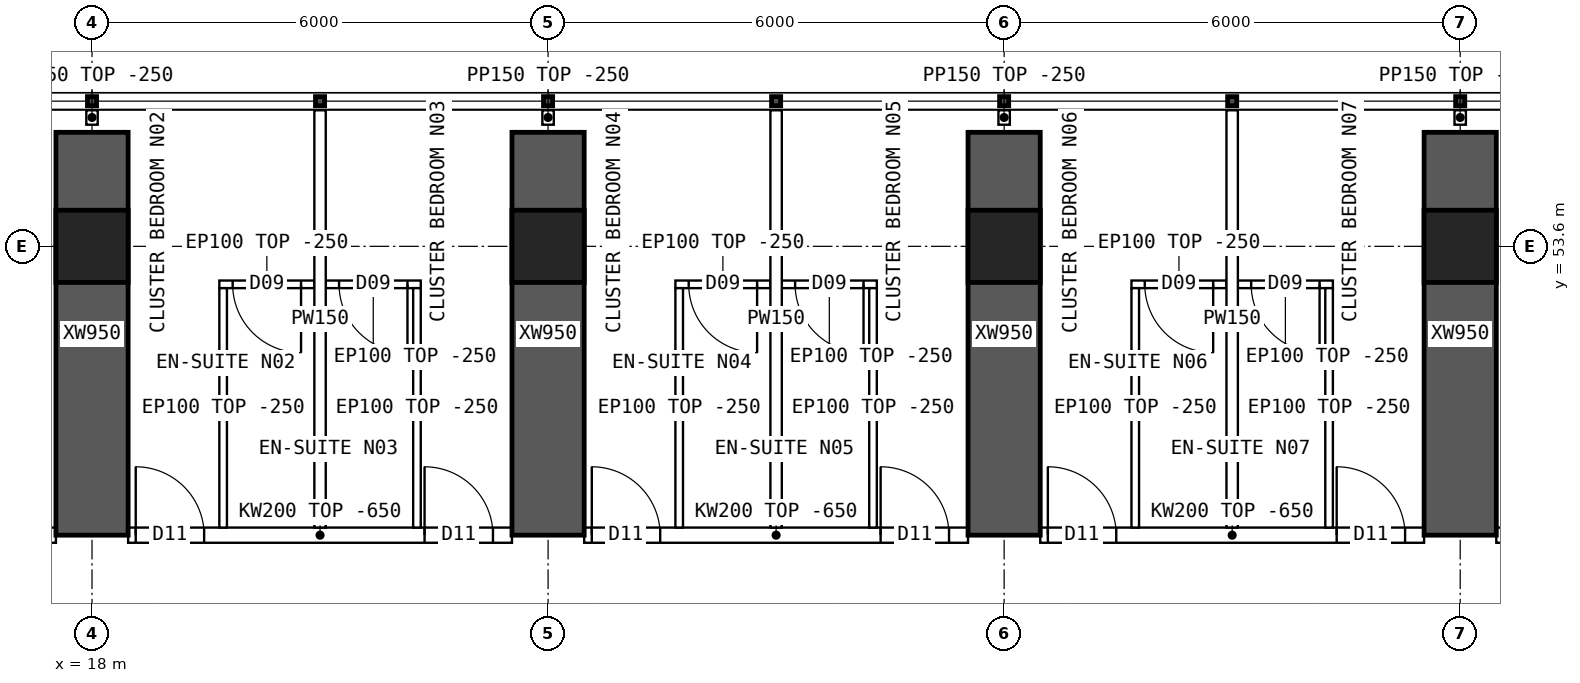
"""IFC4 building model, lengths in metres.
Left out: names, types, materials, properties, quantities, classifications, styles, units other than length and angle.
Written with IfcOpenShell. Run it as: python <this file> out.ifc"""

import sys

from ifc_helpers import new_model, si_unit, direction, frame, frame_2d, origin, origin_2d, place, context, subcontext, project, spatial, polyline, rectangle, hollow_rectangle, outline, extrude, element, fill, save


model = new_model("IFC4")
c1 = context("Model", 3, precision=1e-05, world=origin(), true_north=direction((0.0, 1.0)))
c2 = subcontext(c1, "Body", "Model", "MODEL_VIEW")
j1 = project(units=[si_unit("LENGTHUNIT", "METRE"), si_unit("PLANEANGLEUNIT", "RADIAN")], contexts=[c1])
p1 = place(None, origin())
s1 = spatial("IfcSite", under=j1, at=p1, CompositionType="ELEMENT")
p2 = place(p1, origin())
s2 = spatial("IfcBuilding", under=s1, at=p2, CompositionType="ELEMENT")
p3 = place(p2, frame((0.0, 0.0, 118.15)))
s3 = spatial("IfcBuildingStorey", under=s2, at=p3, CompositionType="ELEMENT", Elevation=118.15)
for number, where, z_axis, x_axis in (
    (1, (18.0, 53.6, 0.0), (0.0, 0.0, 1.0), (1.0, 0.0, 0.0)),
    (2, (24.0, 53.6, 0.0), (0.0, 0.0, 1.0), (1.0, 0.0, 0.0)),
    (3, (30.0, 53.6, 0.0), (0.0, 0.0, 1.0), (1.0, 0.0, 0.0)),
    (4, (36.0, 53.6, 0.0), (0.0, 0.0, 1.0), (1.0, 0.0, 0.0)),
):
    element("IfcColumn", number, at=place(p3, frame(where, z_axis=z_axis, x_axis=x_axis)), inside=s3, PredefinedType="COLUMN", context=c2, shape_type="SweptSolid", body=[
        extrude(hollow_rectangle(XDim=0.95, YDim=0.95, WallThickness=0.095, at=origin_2d()), origin(), (0.0, 0.0, 1.0), 3.75),
    ])
for number, where, z_axis, x_axis in (
    (5, (18.0, 49.8, 0.0), (0.0, 0.0, 1.0), (0.0, 1.0, 0.0)),
    (6, (24.0, 49.8, 0.0), (0.0, 0.0, 1.0), (0.0, 1.0, 0.0)),
    (7, (30.0, 49.8, 0.0), (0.0, 0.0, 1.0), (0.0, 1.0, 0.0)),
    (8, (36.0, 49.8, 0.0), (0.0, 0.0, 1.0), (0.0, 1.0, 0.0)),
):
    element("IfcWall", number, at=place(p3, frame(where, z_axis=z_axis, x_axis=x_axis)), inside=s3, PredefinedType="SHEAR", context=c2, shape_type="SweptSolid", body=[
        extrude(rectangle(XDim=5.3, YDim=0.95, at=frame_2d((2.65, 0.0))), origin(), (0.0, 0.0, 1.0), 3.75),
    ])
p4 = place(p3, frame((12.475, 49.8, 0.0), z_axis=(0.0, 0.0, 1.0), x_axis=(1.0, 0.0, 0.0)))
e9 = element("IfcWall", 9, at=p4, inside=s3, PredefinedType="SOLIDWALL", context=c2, shape_type="SweptSolid", body=[
    extrude(outline(polyline([(0.0, 0.0), (5.05, 0.0), (5.05, 3.1), (0.0, 3.1), (0.0, 0.0)])), frame((0.0, 0.1, 0.0), z_axis=(0.0, -1.0, 0.0), x_axis=(1.0, 0.0, 0.0)), (0.0, 0.0, 1.0), 0.2),
])
p5 = place(p4, frame((0.1, 0.0, 0.0)))
e10 = element("IfcOpeningElement", 10, at=p5, cuts=e9, PredefinedType="OPENING", context=c2, shape_type="SweptSolid", body=[
    extrude(rectangle(XDim=0.9, YDim=2.1, at=frame_2d((0.45, 1.05))), frame((0.0, 0.11, 0.0), z_axis=(0.0, -1.0, 0.0), x_axis=(1.0, 0.0, 0.0)), (0.0, 0.0, 1.0), 0.22),
])
p6 = place(p4, frame((3.9, 0.0, 0.0)))
e11 = element("IfcOpeningElement", 11, at=p6, cuts=e9, PredefinedType="OPENING", context=c2, shape_type="SweptSolid", body=[
    extrude(rectangle(XDim=0.9, YDim=2.1, at=frame_2d((0.45, 1.05))), frame((0.0, 0.11, 0.0), z_axis=(0.0, -1.0, 0.0), x_axis=(1.0, 0.0, 0.0)), (0.0, 0.0, 1.0), 0.22),
])
p7 = place(p3, frame((18.475, 49.8, 0.0), z_axis=(0.0, 0.0, 1.0), x_axis=(1.0, 0.0, 0.0)))
e12 = element("IfcWall", 12, at=p7, inside=s3, PredefinedType="SOLIDWALL", context=c2, shape_type="SweptSolid", body=[
    extrude(outline(polyline([(0.0, 0.0), (5.05, 0.0), (5.05, 3.1), (0.0, 3.1), (0.0, 0.0)])), frame((0.0, 0.1, 0.0), z_axis=(0.0, -1.0, 0.0), x_axis=(1.0, 0.0, 0.0)), (0.0, 0.0, 1.0), 0.2),
])
p8 = place(p7, frame((0.1, 0.0, 0.0)))
e13 = element("IfcOpeningElement", 13, at=p8, cuts=e12, PredefinedType="OPENING", context=c2, shape_type="SweptSolid", body=[
    extrude(rectangle(XDim=0.9, YDim=2.1, at=frame_2d((0.45, 1.05))), frame((0.0, 0.11, 0.0), z_axis=(0.0, -1.0, 0.0), x_axis=(1.0, 0.0, 0.0)), (0.0, 0.0, 1.0), 0.22),
])
p9 = place(p7, frame((3.9, 0.0, 0.0)))
e14 = element("IfcOpeningElement", 14, at=p9, cuts=e12, PredefinedType="OPENING", context=c2, shape_type="SweptSolid", body=[
    extrude(rectangle(XDim=0.9, YDim=2.1, at=frame_2d((0.45, 1.05))), frame((0.0, 0.11, 0.0), z_axis=(0.0, -1.0, 0.0), x_axis=(1.0, 0.0, 0.0)), (0.0, 0.0, 1.0), 0.22),
])
p10 = place(p3, frame((24.475, 49.8, 0.0), z_axis=(0.0, 0.0, 1.0), x_axis=(1.0, 0.0, 0.0)))
e15 = element("IfcWall", 15, at=p10, inside=s3, PredefinedType="SOLIDWALL", context=c2, shape_type="SweptSolid", body=[
    extrude(outline(polyline([(0.0, 0.0), (5.05, 0.0), (5.05, 3.1), (0.0, 3.1), (0.0, 0.0)])), frame((0.0, 0.1, 0.0), z_axis=(0.0, -1.0, 0.0), x_axis=(1.0, 0.0, 0.0)), (0.0, 0.0, 1.0), 0.2),
])
p11 = place(p10, frame((0.1, 0.0, 0.0)))
e16 = element("IfcOpeningElement", 16, at=p11, cuts=e15, PredefinedType="OPENING", context=c2, shape_type="SweptSolid", body=[
    extrude(rectangle(XDim=0.9, YDim=2.1, at=frame_2d((0.45, 1.05))), frame((0.0, 0.11, 0.0), z_axis=(0.0, -1.0, 0.0), x_axis=(1.0, 0.0, 0.0)), (0.0, 0.0, 1.0), 0.22),
])
p12 = place(p10, frame((3.9, 0.0, 0.0)))
e17 = element("IfcOpeningElement", 17, at=p12, cuts=e15, PredefinedType="OPENING", context=c2, shape_type="SweptSolid", body=[
    extrude(rectangle(XDim=0.9, YDim=2.1, at=frame_2d((0.45, 1.05))), frame((0.0, 0.11, 0.0), z_axis=(0.0, -1.0, 0.0), x_axis=(1.0, 0.0, 0.0)), (0.0, 0.0, 1.0), 0.22),
])
p13 = place(p3, frame((30.475, 49.8, 0.0), z_axis=(0.0, 0.0, 1.0), x_axis=(1.0, 0.0, 0.0)))
e18 = element("IfcWall", 18, at=p13, inside=s3, PredefinedType="SOLIDWALL", context=c2, shape_type="SweptSolid", body=[
    extrude(outline(polyline([(0.0, 0.0), (5.05, 0.0), (5.05, 3.1), (0.0, 3.1), (0.0, 0.0)])), frame((0.0, 0.1, 0.0), z_axis=(0.0, -1.0, 0.0), x_axis=(1.0, 0.0, 0.0)), (0.0, 0.0, 1.0), 0.2),
])
p14 = place(p13, frame((0.1, 0.0, 0.0)))
e19 = element("IfcOpeningElement", 19, at=p14, cuts=e18, PredefinedType="OPENING", context=c2, shape_type="SweptSolid", body=[
    extrude(rectangle(XDim=0.9, YDim=2.1, at=frame_2d((0.45, 1.05))), frame((0.0, 0.11, 0.0), z_axis=(0.0, -1.0, 0.0), x_axis=(1.0, 0.0, 0.0)), (0.0, 0.0, 1.0), 0.22),
])
p15 = place(p13, frame((3.9, 0.0, 0.0)))
e20 = element("IfcOpeningElement", 20, at=p15, cuts=e18, PredefinedType="OPENING", context=c2, shape_type="SweptSolid", body=[
    extrude(rectangle(XDim=0.9, YDim=2.1, at=frame_2d((0.45, 1.05))), frame((0.0, 0.11, 0.0), z_axis=(0.0, -1.0, 0.0), x_axis=(1.0, 0.0, 0.0)), (0.0, 0.0, 1.0), 0.22),
])
p16 = place(p3, frame((36.475, 49.8, 0.0), z_axis=(0.0, 0.0, 1.0), x_axis=(1.0, 0.0, 0.0)))
e21 = element("IfcWall", 21, at=p16, inside=s3, PredefinedType="SOLIDWALL", context=c2, shape_type="SweptSolid", body=[
    extrude(outline(polyline([(0.0, 0.0), (5.05, 0.0), (5.05, 3.1), (0.0, 3.1), (0.0, 0.0)])), frame((0.0, 0.1, 0.0), z_axis=(0.0, -1.0, 0.0), x_axis=(1.0, 0.0, 0.0)), (0.0, 0.0, 1.0), 0.2),
])
p17 = place(p16, frame((0.3, 0.0, 0.0)))
e22 = element("IfcOpeningElement", 22, at=p17, cuts=e21, PredefinedType="OPENING", context=c2, shape_type="SweptSolid", body=[
    extrude(rectangle(XDim=1.0, YDim=2.1, at=frame_2d((0.5, 1.05))), frame((0.0, 0.11, 0.0), z_axis=(0.0, -1.0, 0.0), x_axis=(1.0, 0.0, 0.0)), (0.0, 0.0, 1.0), 0.22),
])
p18 = place(p3, frame((21.0, 55.39, 0.0), z_axis=(0.0, 0.0, 1.0), x_axis=(0.0, -1.0, 0.0)))
e23 = element("IfcWall", 23, at=p18, inside=s3, PredefinedType="PARTITIONING", context=c2, shape_type="SweptSolid", body=[
    extrude(outline(polyline([(0.0, 0.0), (5.49, 0.0), (5.49, 3.1), (5.442, 3.1), (5.44, 3.5), (1.992, 3.5), (1.99, 3.1), (1.592, 3.1), (1.59, 3.5), (0.0, 3.5), (0.0, 0.0)])), frame((0.0, 0.075, 0.0), z_axis=(0.0, -1.0, 0.0), x_axis=(1.0, 0.0, 0.0)), (0.0, 0.0, 1.0), 0.15),
])
p19 = place(p3, frame((19.675, 53.1, 0.0), z_axis=(0.0, 0.0, 1.0), x_axis=(1.0, 0.0, 0.0)))
e24 = element("IfcWall", 24, at=p19, inside=s3, PredefinedType="PARTITIONING", context=c2, shape_type="SweptSolid", body=[
    extrude(rectangle(XDim=1.25, YDim=0.1, at=frame_2d((0.625, 0.0))), origin(), (0.0, 0.0, 1.0), 3.5),
])
p20 = place(p19, frame((0.175, 0.0, 0.0)))
e25 = element("IfcOpeningElement", 25, at=p20, cuts=e24, PredefinedType="OPENING", context=c2, shape_type="SweptSolid", body=[
    extrude(rectangle(XDim=0.9, YDim=2.1, at=frame_2d((0.45, 1.05))), frame((0.0, 0.06, 0.0), z_axis=(0.0, -1.0, 0.0), x_axis=(1.0, 0.0, 0.0)), (0.0, 0.0, 1.0), 0.12),
])
p21 = place(p3, frame((19.725, 53.05, 0.0), z_axis=(0.0, 0.0, 1.0), x_axis=(0.0, -1.0, 0.0)))
e26 = element("IfcWall", 26, at=p21, inside=s3, PredefinedType="PARTITIONING", context=c2, shape_type="SweptSolid", body=[
    extrude(outline(polyline([(0.0, 0.0), (3.15, 0.0), (3.15, 3.1), (3.102, 3.1), (3.1, 3.5), (0.0, 3.5), (0.0, 0.0)])), frame((0.0, 0.05, 0.0), z_axis=(0.0, -1.0, 0.0), x_axis=(1.0, 0.0, 0.0)), (0.0, 0.0, 1.0), 0.1),
])
p22 = place(p3, frame((21.075, 53.1, 0.0), z_axis=(0.0, 0.0, 1.0), x_axis=(1.0, 0.0, 0.0)))
e27 = element("IfcWall", 27, at=p22, inside=s3, PredefinedType="PARTITIONING", context=c2, shape_type="SweptSolid", body=[
    extrude(rectangle(XDim=1.25, YDim=0.1, at=frame_2d((0.625, 0.0))), origin(), (0.0, 0.0, 1.0), 3.5),
])
p23 = place(p22, frame((0.175, 0.0, 0.0)))
e28 = element("IfcOpeningElement", 28, at=p23, cuts=e27, PredefinedType="OPENING", context=c2, shape_type="SweptSolid", body=[
    extrude(rectangle(XDim=0.9, YDim=2.1, at=frame_2d((0.45, 1.05))), frame((0.0, 0.06, 0.0), z_axis=(0.0, -1.0, 0.0), x_axis=(1.0, 0.0, 0.0)), (0.0, 0.0, 1.0), 0.12),
])
p24 = place(p3, frame((22.275, 53.05, 0.0), z_axis=(0.0, 0.0, 1.0), x_axis=(0.0, -1.0, 0.0)))
e29 = element("IfcWall", 29, at=p24, inside=s3, PredefinedType="PARTITIONING", context=c2, shape_type="SweptSolid", body=[
    extrude(outline(polyline([(0.0, 0.0), (3.15, 0.0), (3.15, 3.1), (3.102, 3.1), (3.1, 3.5), (0.0, 3.5), (0.0, 0.0)])), frame((0.0, 0.05, 0.0), z_axis=(0.0, -1.0, 0.0), x_axis=(1.0, 0.0, 0.0)), (0.0, 0.0, 1.0), 0.1),
])
p25 = place(p3, frame((27.0, 55.39, 0.0), z_axis=(0.0, 0.0, 1.0), x_axis=(0.0, -1.0, 0.0)))
e30 = element("IfcWall", 30, at=p25, inside=s3, PredefinedType="PARTITIONING", context=c2, shape_type="SweptSolid", body=[
    extrude(outline(polyline([(0.0, 0.0), (5.49, 0.0), (5.49, 3.1), (5.442, 3.1), (5.44, 3.5), (1.992, 3.5), (1.99, 3.1), (1.592, 3.1), (1.59, 3.5), (0.0, 3.5), (0.0, 0.0)])), frame((0.0, 0.075, 0.0), z_axis=(0.0, -1.0, 0.0), x_axis=(1.0, 0.0, 0.0)), (0.0, 0.0, 1.0), 0.15),
])
p26 = place(p3, frame((25.675, 53.1, 0.0), z_axis=(0.0, 0.0, 1.0), x_axis=(1.0, 0.0, 0.0)))
e31 = element("IfcWall", 31, at=p26, inside=s3, PredefinedType="PARTITIONING", context=c2, shape_type="SweptSolid", body=[
    extrude(rectangle(XDim=1.25, YDim=0.1, at=frame_2d((0.625, 0.0))), origin(), (0.0, 0.0, 1.0), 3.5),
])
p27 = place(p26, frame((0.175, 0.0, 0.0)))
e32 = element("IfcOpeningElement", 32, at=p27, cuts=e31, PredefinedType="OPENING", context=c2, shape_type="SweptSolid", body=[
    extrude(rectangle(XDim=0.9, YDim=2.1, at=frame_2d((0.45, 1.05))), frame((0.0, 0.06, 0.0), z_axis=(0.0, -1.0, 0.0), x_axis=(1.0, 0.0, 0.0)), (0.0, 0.0, 1.0), 0.12),
])
p28 = place(p3, frame((25.725, 53.05, 0.0), z_axis=(0.0, 0.0, 1.0), x_axis=(0.0, -1.0, 0.0)))
e33 = element("IfcWall", 33, at=p28, inside=s3, PredefinedType="PARTITIONING", context=c2, shape_type="SweptSolid", body=[
    extrude(outline(polyline([(0.0, 0.0), (3.15, 0.0), (3.15, 3.1), (3.102, 3.1), (3.1, 3.5), (0.0, 3.5), (0.0, 0.0)])), frame((0.0, 0.05, 0.0), z_axis=(0.0, -1.0, 0.0), x_axis=(1.0, 0.0, 0.0)), (0.0, 0.0, 1.0), 0.1),
])
p29 = place(p3, frame((27.075, 53.1, 0.0), z_axis=(0.0, 0.0, 1.0), x_axis=(1.0, 0.0, 0.0)))
e34 = element("IfcWall", 34, at=p29, inside=s3, PredefinedType="PARTITIONING", context=c2, shape_type="SweptSolid", body=[
    extrude(rectangle(XDim=1.25, YDim=0.1, at=frame_2d((0.625, 0.0))), origin(), (0.0, 0.0, 1.0), 3.5),
])
p30 = place(p29, frame((0.175, 0.0, 0.0)))
e35 = element("IfcOpeningElement", 35, at=p30, cuts=e34, PredefinedType="OPENING", context=c2, shape_type="SweptSolid", body=[
    extrude(rectangle(XDim=0.9, YDim=2.1, at=frame_2d((0.45, 1.05))), frame((0.0, 0.06, 0.0), z_axis=(0.0, -1.0, 0.0), x_axis=(1.0, 0.0, 0.0)), (0.0, 0.0, 1.0), 0.12),
])
p31 = place(p3, frame((28.275, 53.05, 0.0), z_axis=(0.0, 0.0, 1.0), x_axis=(0.0, -1.0, 0.0)))
e36 = element("IfcWall", 36, at=p31, inside=s3, PredefinedType="PARTITIONING", context=c2, shape_type="SweptSolid", body=[
    extrude(outline(polyline([(0.0, 0.0), (3.15, 0.0), (3.15, 3.1), (3.102, 3.1), (3.1, 3.5), (0.0, 3.5), (0.0, 0.0)])), frame((0.0, 0.05, 0.0), z_axis=(0.0, -1.0, 0.0), x_axis=(1.0, 0.0, 0.0)), (0.0, 0.0, 1.0), 0.1),
])
p32 = place(p3, frame((33.0, 55.39, 0.0), z_axis=(0.0, 0.0, 1.0), x_axis=(0.0, -1.0, 0.0)))
e37 = element("IfcWall", 37, at=p32, inside=s3, PredefinedType="PARTITIONING", context=c2, shape_type="SweptSolid", body=[
    extrude(outline(polyline([(0.0, 0.0), (5.49, 0.0), (5.49, 3.1), (5.442, 3.1), (5.44, 3.5), (1.992, 3.5), (1.99, 3.1), (1.592, 3.1), (1.59, 3.5), (0.0, 3.5), (0.0, 0.0)])), frame((0.0, 0.075, 0.0), z_axis=(0.0, -1.0, 0.0), x_axis=(1.0, 0.0, 0.0)), (0.0, 0.0, 1.0), 0.15),
])
p33 = place(p3, frame((31.675, 53.1, 0.0), z_axis=(0.0, 0.0, 1.0), x_axis=(1.0, 0.0, 0.0)))
e38 = element("IfcWall", 38, at=p33, inside=s3, PredefinedType="PARTITIONING", context=c2, shape_type="SweptSolid", body=[
    extrude(rectangle(XDim=1.25, YDim=0.1, at=frame_2d((0.625, 0.0))), origin(), (0.0, 0.0, 1.0), 3.5),
])
p34 = place(p33, frame((0.175, 0.0, 0.0)))
e39 = element("IfcOpeningElement", 39, at=p34, cuts=e38, PredefinedType="OPENING", context=c2, shape_type="SweptSolid", body=[
    extrude(rectangle(XDim=0.9, YDim=2.1, at=frame_2d((0.45, 1.05))), frame((0.0, 0.06, 0.0), z_axis=(0.0, -1.0, 0.0), x_axis=(1.0, 0.0, 0.0)), (0.0, 0.0, 1.0), 0.12),
])
p35 = place(p3, frame((31.725, 53.05, 0.0), z_axis=(0.0, 0.0, 1.0), x_axis=(0.0, -1.0, 0.0)))
e40 = element("IfcWall", 40, at=p35, inside=s3, PredefinedType="PARTITIONING", context=c2, shape_type="SweptSolid", body=[
    extrude(outline(polyline([(0.0, 0.0), (3.15, 0.0), (3.15, 3.1), (3.102, 3.1), (3.1, 3.5), (0.0, 3.5), (0.0, 0.0)])), frame((0.0, 0.05, 0.0), z_axis=(0.0, -1.0, 0.0), x_axis=(1.0, 0.0, 0.0)), (0.0, 0.0, 1.0), 0.1),
])
p36 = place(p3, frame((33.075, 53.1, 0.0), z_axis=(0.0, 0.0, 1.0), x_axis=(1.0, 0.0, 0.0)))
e41 = element("IfcWall", 41, at=p36, inside=s3, PredefinedType="PARTITIONING", context=c2, shape_type="SweptSolid", body=[
    extrude(rectangle(XDim=1.25, YDim=0.1, at=frame_2d((0.625, 0.0))), origin(), (0.0, 0.0, 1.0), 3.5),
])
p37 = place(p36, frame((0.175, 0.0, 0.0)))
e42 = element("IfcOpeningElement", 42, at=p37, cuts=e41, PredefinedType="OPENING", context=c2, shape_type="SweptSolid", body=[
    extrude(rectangle(XDim=0.9, YDim=2.1, at=frame_2d((0.45, 1.05))), frame((0.0, 0.06, 0.0), z_axis=(0.0, -1.0, 0.0), x_axis=(1.0, 0.0, 0.0)), (0.0, 0.0, 1.0), 0.12),
])
p38 = place(p3, frame((34.275, 53.05, 0.0), z_axis=(0.0, 0.0, 1.0), x_axis=(0.0, -1.0, 0.0)))
e43 = element("IfcWall", 43, at=p38, inside=s3, PredefinedType="PARTITIONING", context=c2, shape_type="SweptSolid", body=[
    extrude(outline(polyline([(0.0, 0.0), (3.15, 0.0), (3.15, 3.1), (3.102, 3.1), (3.1, 3.5), (0.0, 3.5), (0.0, 0.0)])), frame((0.0, 0.05, 0.0), z_axis=(0.0, -1.0, 0.0), x_axis=(1.0, 0.0, 0.0)), (0.0, 0.0, 1.0), 0.1),
])
for number, where, z_axis, x_axis in (
    (44, (18.0, 55.2, 0.0), (0.0, 0.0, 1.0), (0.0, 1.0, 0.0)),
    (45, (24.0, 55.2, 0.0), (0.0, 0.0, 1.0), (0.0, 1.0, 0.0)),
    (46, (30.0, 55.2, 0.0), (0.0, 0.0, 1.0), (0.0, 1.0, 0.0)),
    (47, (36.0, 55.2, 0.0), (0.0, 0.0, 1.0), (0.0, 1.0, 0.0)),
):
    element("IfcWall", number, at=place(p3, frame(where, z_axis=z_axis, x_axis=x_axis)), inside=s3, PredefinedType="PARTITIONING", context=c2, shape_type="SweptSolid", body=[
        extrude(rectangle(XDim=0.19, YDim=0.15, at=frame_2d((0.095, 0.0))), origin(), (0.0, 0.0, 1.0), 3.5),
    ])
p39 = place(p20, origin())
e48 = element("IfcDoor", 48, at=p39, inside=s3, OperationType="SINGLE_SWING_RIGHT", PredefinedType="DOOR", context=c2, shape_type="SweptSolid", body=[
    extrude(rectangle(XDim=0.9, YDim=2.1, at=frame_2d((0.45, 1.05))), frame((0.0, 0.025, 0.0), z_axis=(0.0, -1.0, 0.0), x_axis=(1.0, 0.0, 0.0)), (0.0, 0.0, 1.0), 0.05),
])
fill(e25, e48)
p40 = place(p8, origin())
e49 = element("IfcDoor", 49, at=p40, inside=s3, OperationType="SINGLE_SWING_LEFT", PredefinedType="DOOR", context=c2, shape_type="SweptSolid", body=[
    extrude(rectangle(XDim=0.9, YDim=2.1, at=frame_2d((0.45, 1.05))), frame((0.0, 0.025, 0.0), z_axis=(0.0, -1.0, 0.0), x_axis=(1.0, 0.0, 0.0)), (0.0, 0.0, 1.0), 0.05),
])
fill(e13, e49)
p41 = place(p23, origin())
e50 = element("IfcDoor", 50, at=p41, inside=s3, OperationType="SINGLE_SWING_RIGHT", PredefinedType="DOOR", context=c2, shape_type="SweptSolid", body=[
    extrude(rectangle(XDim=0.9, YDim=2.1, at=frame_2d((0.45, 1.05))), frame((0.0, 0.025, 0.0), z_axis=(0.0, -1.0, 0.0), x_axis=(1.0, 0.0, 0.0)), (0.0, 0.0, 1.0), 0.05),
])
fill(e28, e50)
p42 = place(p9, origin())
e51 = element("IfcDoor", 51, at=p42, inside=s3, OperationType="SINGLE_SWING_LEFT", PredefinedType="DOOR", context=c2, shape_type="SweptSolid", body=[
    extrude(rectangle(XDim=0.9, YDim=2.1, at=frame_2d((0.45, 1.05))), frame((0.0, 0.025, 0.0), z_axis=(0.0, -1.0, 0.0), x_axis=(1.0, 0.0, 0.0)), (0.0, 0.0, 1.0), 0.05),
])
fill(e14, e51)
p43 = place(p27, origin())
e52 = element("IfcDoor", 52, at=p43, inside=s3, OperationType="SINGLE_SWING_RIGHT", PredefinedType="DOOR", context=c2, shape_type="SweptSolid", body=[
    extrude(rectangle(XDim=0.9, YDim=2.1, at=frame_2d((0.45, 1.05))), frame((0.0, 0.025, 0.0), z_axis=(0.0, -1.0, 0.0), x_axis=(1.0, 0.0, 0.0)), (0.0, 0.0, 1.0), 0.05),
])
fill(e32, e52)
p44 = place(p11, origin())
e53 = element("IfcDoor", 53, at=p44, inside=s3, OperationType="SINGLE_SWING_LEFT", PredefinedType="DOOR", context=c2, shape_type="SweptSolid", body=[
    extrude(rectangle(XDim=0.9, YDim=2.1, at=frame_2d((0.45, 1.05))), frame((0.0, 0.025, 0.0), z_axis=(0.0, -1.0, 0.0), x_axis=(1.0, 0.0, 0.0)), (0.0, 0.0, 1.0), 0.05),
])
fill(e16, e53)
p45 = place(p30, origin())
e54 = element("IfcDoor", 54, at=p45, inside=s3, OperationType="SINGLE_SWING_RIGHT", PredefinedType="DOOR", context=c2, shape_type="SweptSolid", body=[
    extrude(rectangle(XDim=0.9, YDim=2.1, at=frame_2d((0.45, 1.05))), frame((0.0, 0.025, 0.0), z_axis=(0.0, -1.0, 0.0), x_axis=(1.0, 0.0, 0.0)), (0.0, 0.0, 1.0), 0.05),
])
fill(e35, e54)
p46 = place(p12, origin())
e55 = element("IfcDoor", 55, at=p46, inside=s3, OperationType="SINGLE_SWING_LEFT", PredefinedType="DOOR", context=c2, shape_type="SweptSolid", body=[
    extrude(rectangle(XDim=0.9, YDim=2.1, at=frame_2d((0.45, 1.05))), frame((0.0, 0.025, 0.0), z_axis=(0.0, -1.0, 0.0), x_axis=(1.0, 0.0, 0.0)), (0.0, 0.0, 1.0), 0.05),
])
fill(e17, e55)
p47 = place(p34, origin())
e56 = element("IfcDoor", 56, at=p47, inside=s3, OperationType="SINGLE_SWING_RIGHT", PredefinedType="DOOR", context=c2, shape_type="SweptSolid", body=[
    extrude(rectangle(XDim=0.9, YDim=2.1, at=frame_2d((0.45, 1.05))), frame((0.0, 0.025, 0.0), z_axis=(0.0, -1.0, 0.0), x_axis=(1.0, 0.0, 0.0)), (0.0, 0.0, 1.0), 0.05),
])
fill(e39, e56)
p48 = place(p14, origin())
e57 = element("IfcDoor", 57, at=p48, inside=s3, OperationType="SINGLE_SWING_LEFT", PredefinedType="DOOR", context=c2, shape_type="SweptSolid", body=[
    extrude(rectangle(XDim=0.9, YDim=2.1, at=frame_2d((0.45, 1.05))), frame((0.0, 0.025, 0.0), z_axis=(0.0, -1.0, 0.0), x_axis=(1.0, 0.0, 0.0)), (0.0, 0.0, 1.0), 0.05),
])
fill(e19, e57)
p49 = place(p37, origin())
e58 = element("IfcDoor", 58, at=p49, inside=s3, OperationType="SINGLE_SWING_RIGHT", PredefinedType="DOOR", context=c2, shape_type="SweptSolid", body=[
    extrude(rectangle(XDim=0.9, YDim=2.1, at=frame_2d((0.45, 1.05))), frame((0.0, 0.025, 0.0), z_axis=(0.0, -1.0, 0.0), x_axis=(1.0, 0.0, 0.0)), (0.0, 0.0, 1.0), 0.05),
])
fill(e42, e58)
p50 = place(p15, origin())
e59 = element("IfcDoor", 59, at=p50, inside=s3, OperationType="SINGLE_SWING_LEFT", PredefinedType="DOOR", context=c2, shape_type="SweptSolid", body=[
    extrude(rectangle(XDim=0.9, YDim=2.1, at=frame_2d((0.45, 1.05))), frame((0.0, 0.025, 0.0), z_axis=(0.0, -1.0, 0.0), x_axis=(1.0, 0.0, 0.0)), (0.0, 0.0, 1.0), 0.05),
])
fill(e20, e59)
save(model, sys.argv[1])
